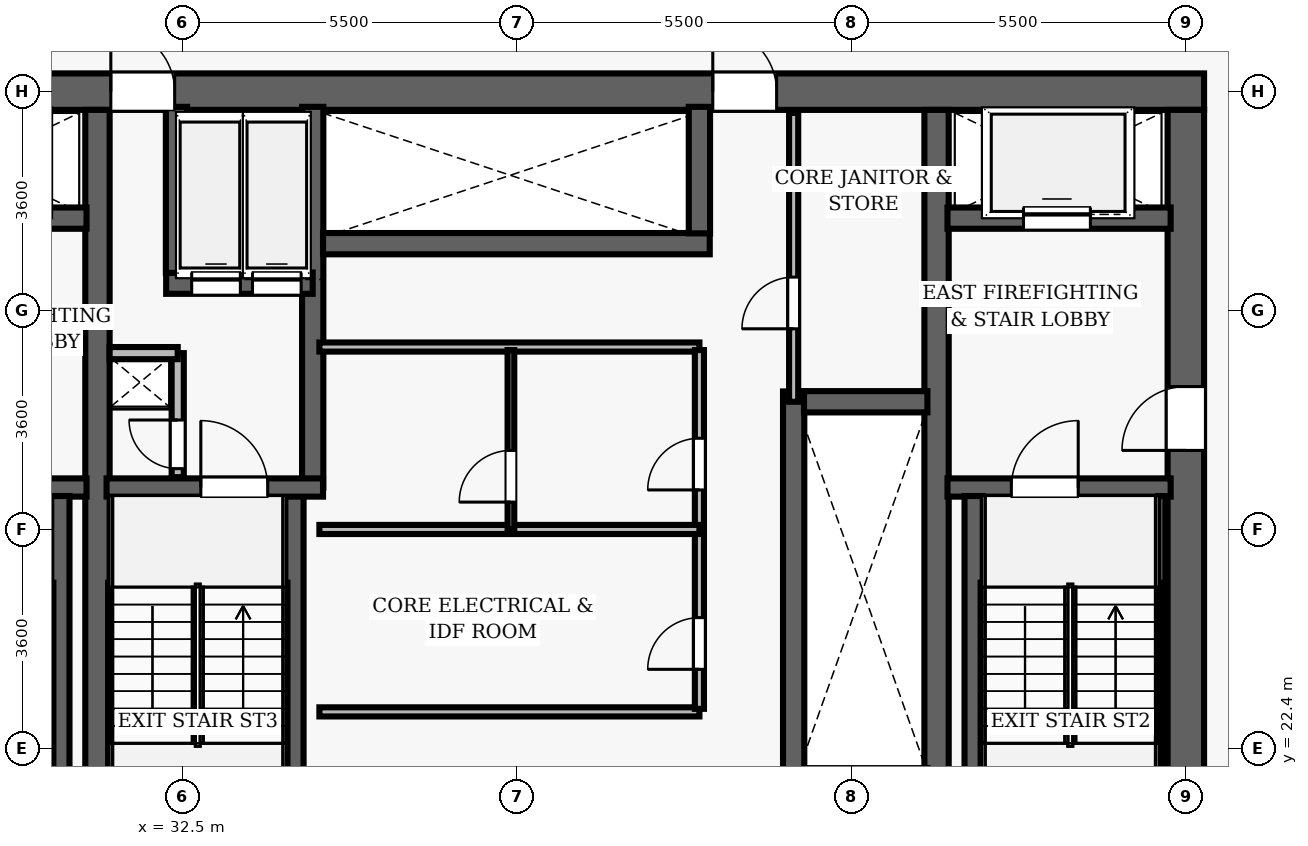
"""IFC4 building model, lengths in metres.
Left out: names, types, materials, properties, quantities, classifications, styles, units other than length and angle.
Written with IfcOpenShell. Run it as: python <this file> out.ifc"""

import sys

from ifc_helpers import new_model, si_unit, direction, frame, frame_2d, origin, place, context, subcontext, project, spatial, rectangle, extrude, element, fill, save


model = new_model("IFC4")
c1 = context("Model", 3, precision=1e-05, world=origin(), true_north=direction((0.0, 1.0)))
c2 = subcontext(c1, "Body", "Model", "MODEL_VIEW")
j1 = project(units=[si_unit("LENGTHUNIT", "METRE"), si_unit("PLANEANGLEUNIT", "RADIAN")], contexts=[c1])
p1 = place(None, origin())
s1 = spatial("IfcSite", under=j1, at=p1, CompositionType="ELEMENT")
p2 = place(p1, origin())
s2 = spatial("IfcBuilding", under=s1, at=p2, CompositionType="ELEMENT")
p3 = place(p2, frame((0.0, 0.0, 12.0)))
s3 = spatial("IfcBuildingStorey", under=s2, at=p3, CompositionType="ELEMENT", Elevation=12.0)
p4 = place(p3, frame((26.7, 33.2, 0.0), z_axis=(0.0, 0.0, 1.0), x_axis=(1.0, 0.0, 0.0)))
e1 = element("IfcWall", 1, at=p4, inside=s3, PredefinedType="SHEAR", context=c2, shape_type="SweptSolid", body=[
    extrude(rectangle(XDim=22.6, YDim=0.6, at=frame_2d((11.3, 0.0))), origin(), (0.0, 0.0, 1.0), 6.6),
])
p5 = place(p4, frame((4.62, 0.0, 0.0)))
e2 = element("IfcOpeningElement", 2, at=p5, cuts=e1, PredefinedType="OPENING", context=c2, shape_type="SweptSolid", body=[
    extrude(rectangle(XDim=1.05, YDim=2.15, at=frame_2d((0.525, 1.075))), frame((0.0, 0.31, 0.0), z_axis=(0.0, -1.0, 0.0), x_axis=(1.0, 0.0, 0.0)), (0.0, 0.0, 1.0), 0.62),
])
p6 = place(p4, frame((14.52, 0.0, 0.0)))
e3 = element("IfcOpeningElement", 3, at=p6, cuts=e1, PredefinedType="OPENING", context=c2, shape_type="SweptSolid", body=[
    extrude(rectangle(XDim=1.05, YDim=2.15, at=frame_2d((0.525, 1.075))), frame((0.0, 0.31, 0.0), z_axis=(0.0, -1.0, 0.0), x_axis=(1.0, 0.0, 0.0)), (0.0, 0.0, 1.0), 0.62),
])
p7 = place(p3, frame((49.0, 19.1, 0.0), z_axis=(0.0, 0.0, 1.0), x_axis=(0.0, 1.0, 0.0)))
e4 = element("IfcWall", 4, at=p7, inside=s3, PredefinedType="SHEAR", context=c2, shape_type="SweptSolid", body=[
    extrude(rectangle(XDim=13.8, YDim=0.6, at=frame_2d((6.9, 0.0))), origin(), (0.0, 0.0, 1.0), 6.6),
])
p8 = place(p7, frame((8.2, 0.0, 0.0)))
e5 = element("IfcOpeningElement", 5, at=p8, cuts=e4, PredefinedType="OPENING", context=c2, shape_type="SweptSolid", body=[
    extrude(rectangle(XDim=1.05, YDim=2.15, at=frame_2d((0.525, 1.075))), frame((0.0, 0.31, 0.0), z_axis=(0.0, -1.0, 0.0), x_axis=(1.0, 0.0, 0.0)), (0.0, 0.0, 1.0), 0.62),
])
for number, where, z_axis, x_axis in (
    (6, (31.1, 19.1, 0.0), (0.0, 0.0, 1.0), (0.0, 1.0, 0.0)),
    (7, (44.9, 19.1, 0.0), (0.0, 0.0, 1.0), (0.0, 1.0, 0.0)),
):
    element("IfcWall", number, at=place(p3, frame(where, z_axis=z_axis, x_axis=x_axis)), inside=s3, PredefinedType="SHEAR", context=c2, shape_type="SweptSolid", body=[
        extrude(rectangle(XDim=13.8, YDim=0.4, at=frame_2d((6.9, 0.0))), origin(), (0.0, 0.0, 1.0), 6.6),
    ])
p9 = place(p3, frame((27.25, 26.69, 0.0), z_axis=(0.0, 0.0, 1.0), x_axis=(1.0, 0.0, 0.0)))
e8 = element("IfcWall", 8, at=p9, inside=s3, PredefinedType="SHEAR", context=c2, shape_type="SweptSolid", body=[
    extrude(rectangle(XDim=3.67, YDim=0.3, at=frame_2d((1.835, 0.0))), origin(), (0.0, 0.0, 1.0), 6.6),
])
p10 = place(p9, frame((1.05, 0.0, 0.0)))
e9 = element("IfcOpeningElement", 9, at=p10, cuts=e8, PredefinedType="OPENING", context=c2, shape_type="SweptSolid", body=[
    extrude(rectangle(XDim=1.1, YDim=2.15, at=frame_2d((0.55, 1.075))), frame((0.0, 0.16, 0.0), z_axis=(0.0, -1.0, 0.0), x_axis=(1.0, 0.0, 0.0)), (0.0, 0.0, 1.0), 0.32),
])
p11 = place(p3, frame((30.49, 19.05, 0.0), z_axis=(0.0, 0.0, 1.0), x_axis=(0.0, 1.0, 0.0)))
e10 = element("IfcWall", 10, at=p11, inside=s3, PredefinedType="SHEAR", context=c2, shape_type="SweptSolid", body=[
    extrude(rectangle(XDim=7.5, YDim=0.3, at=frame_2d((3.75, 0.0))), origin(), (0.0, 0.0, 1.0), 6.6),
])
p12 = place(p3, frame((27.25, 31.12, 0.0), z_axis=(0.0, 0.0, 1.0), x_axis=(1.0, 0.0, 0.0)))
e11 = element("IfcWall", 11, at=p12, inside=s3, PredefinedType="SHEAR", context=c2, shape_type="SweptSolid", body=[
    extrude(rectangle(XDim=3.67, YDim=0.35, at=frame_2d((1.835, 0.0))), origin(), (0.0, 0.0, 1.0), 5.31),
])
p13 = place(p12, frame((1.25, 0.0, 0.0)))
e12 = element("IfcOpeningElement", 12, at=p13, cuts=e11, PredefinedType="OPENING", context=c2, shape_type="SweptSolid", body=[
    extrude(rectangle(XDim=1.1, YDim=2.15, at=frame_2d((0.55, 1.075))), frame((0.0, 0.185, 0.0), z_axis=(0.0, -1.0, 0.0), x_axis=(1.0, 0.0, 0.0)), (0.0, 0.0, 1.0), 0.37),
])
p14 = place(p3, frame((45.08, 26.69, 0.0), z_axis=(0.0, 0.0, 1.0), x_axis=(1.0, 0.0, 0.0)))
e13 = element("IfcWall", 13, at=p14, inside=s3, PredefinedType="SHEAR", context=c2, shape_type="SweptSolid", body=[
    extrude(rectangle(XDim=3.67, YDim=0.3, at=frame_2d((1.835, 0.0))), origin(), (0.0, 0.0, 1.0), 6.6),
])
p15 = place(p14, frame((1.05, 0.0, 0.0)))
e14 = element("IfcOpeningElement", 14, at=p15, cuts=e13, PredefinedType="OPENING", context=c2, shape_type="SweptSolid", body=[
    extrude(rectangle(XDim=1.1, YDim=2.15, at=frame_2d((0.55, 1.075))), frame((0.0, 0.16, 0.0), z_axis=(0.0, -1.0, 0.0), x_axis=(1.0, 0.0, 0.0)), (0.0, 0.0, 1.0), 0.32),
])
p16 = place(p3, frame((45.51, 19.05, 0.0), z_axis=(0.0, 0.0, 1.0), x_axis=(0.0, 1.0, 0.0)))
e15 = element("IfcWall", 15, at=p16, inside=s3, PredefinedType="SHEAR", context=c2, shape_type="SweptSolid", body=[
    extrude(rectangle(XDim=7.5, YDim=0.3, at=frame_2d((3.75, 0.0))), origin(), (0.0, 0.0, 1.0), 6.6),
])
p17 = place(p3, frame((48.605, 19.1, 0.0), z_axis=(0.0, 0.0, 1.0), x_axis=(0.0, 1.0, 0.0)))
e16 = element("IfcWall", 16, at=p17, inside=s3, PredefinedType="SHEAR", context=c2, shape_type="SweptSolid", body=[
    extrude(rectangle(XDim=7.45, YDim=0.12, at=frame_2d((3.725, 0.0))), origin(), (0.0, 0.0, 1.0), 6.6),
])
p18 = place(p3, frame((45.08, 31.12, 0.0), z_axis=(0.0, 0.0, 1.0), x_axis=(1.0, 0.0, 0.0)))
e17 = element("IfcWall", 17, at=p18, inside=s3, PredefinedType="SHEAR", context=c2, shape_type="SweptSolid", body=[
    extrude(rectangle(XDim=3.67, YDim=0.35, at=frame_2d((1.835, 0.0))), origin(), (0.0, 0.0, 1.0), 5.31),
])
p19 = place(p18, frame((1.25, 0.0, 0.0)))
e18 = element("IfcOpeningElement", 18, at=p19, cuts=e17, PredefinedType="OPENING", context=c2, shape_type="SweptSolid", body=[
    extrude(rectangle(XDim=1.1, YDim=2.15, at=frame_2d((0.55, 1.075))), frame((0.0, 0.185, 0.0), z_axis=(0.0, -1.0, 0.0), x_axis=(1.0, 0.0, 0.0)), (0.0, 0.0, 1.0), 0.37),
])
p20 = place(p3, frame((34.34, 19.05, 0.0), z_axis=(0.0, 0.0, 1.0), x_axis=(0.0, 1.0, 0.0)))
e19 = element("IfcWall", 19, at=p20, inside=s3, PredefinedType="SHEAR", context=c2, shape_type="SweptSolid", body=[
    extrude(rectangle(XDim=7.5, YDim=0.3, at=frame_2d((3.75, 0.0))), origin(), (0.0, 0.0, 1.0), 6.6),
])
p21 = place(p3, frame((34.64, 26.69, 0.0), z_axis=(0.0, 0.0, 1.0), x_axis=(0.0, 1.0, 0.0)))
e20 = element("IfcWall", 20, at=p21, inside=s3, PredefinedType="SHEAR", context=c2, shape_type="SweptSolid", body=[
    extrude(rectangle(XDim=6.26, YDim=0.35, at=frame_2d((3.13, 0.0))), origin(), (0.0, 0.0, 1.0), 6.6),
])
p22 = place(p3, frame((31.25, 26.69, 0.0), z_axis=(0.0, 0.0, 1.0), x_axis=(1.0, 0.0, 0.0)))
e21 = element("IfcWall", 21, at=p22, inside=s3, PredefinedType="SHEAR", context=c2, shape_type="SweptSolid", body=[
    extrude(rectangle(XDim=3.56, YDim=0.3, at=frame_2d((1.78, 0.0))), origin(), (0.0, 0.0, 1.0), 6.6),
])
p23 = place(p22, frame((1.55, 0.0, 0.0)))
e22 = element("IfcOpeningElement", 22, at=p23, cuts=e21, PredefinedType="OPENING", context=c2, shape_type="SweptSolid", body=[
    extrude(rectangle(XDim=1.1, YDim=2.15, at=frame_2d((0.55, 1.075))), frame((0.0, 0.16, 0.0), z_axis=(0.0, -1.0, 0.0), x_axis=(1.0, 0.0, 0.0)), (0.0, 0.0, 1.0), 0.32),
])
p24 = place(p3, frame((32.23, 30.05, 0.0), z_axis=(0.0, 0.0, 1.0), x_axis=(1.0, 0.0, 0.0)))
e23 = element("IfcWall", 23, at=p24, inside=s3, PredefinedType="SHEAR", context=c2, shape_type="SweptSolid", body=[
    extrude(rectangle(XDim=2.41, YDim=0.35, at=frame_2d((1.205, 0.0))), origin(), (0.0, 0.0, 1.0), 5.31),
])
p25 = place(p24, frame((0.42, 0.0, 0.0)))
e24 = element("IfcOpeningElement", 24, at=p25, cuts=e23, PredefinedType="OPENING", context=c2, shape_type="SweptSolid", body=[
    extrude(rectangle(XDim=0.8, YDim=2.15, at=frame_2d((0.4, 1.075))), frame((0.0, 0.185, 0.0), z_axis=(0.0, -1.0, 0.0), x_axis=(1.0, 0.0, 0.0)), (0.0, 0.0, 1.0), 0.37),
])
p26 = place(p24, frame((1.42, 0.0, 0.0)))
e25 = element("IfcOpeningElement", 25, at=p26, cuts=e23, PredefinedType="OPENING", context=c2, shape_type="SweptSolid", body=[
    extrude(rectangle(XDim=0.8, YDim=2.15, at=frame_2d((0.4, 1.075))), frame((0.0, 0.185, 0.0), z_axis=(0.0, -1.0, 0.0), x_axis=(1.0, 0.0, 0.0)), (0.0, 0.0, 1.0), 0.37),
])
p27 = place(p3, frame((32.4, 30.22, 0.0), z_axis=(0.0, 0.0, 1.0), x_axis=(0.0, 1.0, 0.0)))
e26 = element("IfcWall", 26, at=p27, inside=s3, PredefinedType="SHEAR", context=c2, shape_type="SweptSolid", body=[
    extrude(rectangle(XDim=2.73, YDim=0.35, at=frame_2d((1.365, 0.0))), origin(), (0.0, 0.0, 1.0), 5.31),
])
p28 = place(p3, frame((32.42, 26.86, 0.0), z_axis=(0.0, 0.0, 1.0), x_axis=(0.0, 1.0, 0.0)))
e27 = element("IfcWall", 27, at=p28, inside=s3, PredefinedType="PARTITIONING", context=c2, shape_type="SweptSolid", body=[
    extrude(rectangle(XDim=2.04, YDim=0.2, at=frame_2d((1.02, 0.0))), origin(), (0.0, 0.0, 1.0), 5.31),
])
p29 = place(p28, frame((0.14, 0.0, 0.0)))
e28 = element("IfcOpeningElement", 28, at=p29, cuts=e27, PredefinedType="OPENING", context=c2, shape_type="SweptSolid", body=[
    extrude(rectangle(XDim=0.8, YDim=2.05, at=frame_2d((0.4, 1.025))), frame((0.0, 0.11, 0.0), z_axis=(0.0, -1.0, 0.0), x_axis=(1.0, 0.0, 0.0)), (0.0, 0.0, 1.0), 0.22),
])
p30 = place(p3, frame((31.3, 28.9, 0.0), z_axis=(0.0, 0.0, 1.0), x_axis=(1.0, 0.0, 0.0)))
e29 = element("IfcWall", 29, at=p30, inside=s3, PredefinedType="PARTITIONING", context=c2, shape_type="SweptSolid", body=[
    extrude(rectangle(XDim=1.12, YDim=0.2, at=frame_2d((0.56, 0.0))), origin(), (0.0, 0.0, 1.0), 5.31),
])
p31 = place(p3, frame((42.55, 21.73, 0.0), z_axis=(0.0, 0.0, 1.0), x_axis=(0.0, 1.0, 0.0)))
e30 = element("IfcWall", 30, at=p31, inside=s3, PredefinedType="SHEAR", context=c2, shape_type="SweptSolid", body=[
    extrude(rectangle(XDim=6.54, YDim=0.35, at=frame_2d((3.27, 0.0))), origin(), (0.0, 0.0, 1.0), 5.31),
])
p32 = place(p3, frame((42.72, 28.1, 0.0), z_axis=(0.0, 0.0, 1.0), x_axis=(1.0, 0.0, 0.0)))
e31 = element("IfcWall", 31, at=p32, inside=s3, PredefinedType="SHEAR", context=c2, shape_type="SweptSolid", body=[
    extrude(rectangle(XDim=2.03, YDim=0.35, at=frame_2d((1.015, 0.0))), origin(), (0.0, 0.0, 1.0), 5.31),
])
p33 = place(p3, frame((34.81, 30.7, 0.0), z_axis=(0.0, 0.0, 1.0), x_axis=(1.0, 0.0, 0.0)))
e32 = element("IfcWall", 32, at=p33, inside=s3, PredefinedType="SHEAR", context=c2, shape_type="SweptSolid", body=[
    extrude(rectangle(XDim=6.36, YDim=0.35, at=frame_2d((3.18, 0.0))), origin(), (0.0, 0.0, 1.0), 5.31),
])
p34 = place(p3, frame((41.0, 30.87, 0.0), z_axis=(0.0, 0.0, 1.0), x_axis=(0.0, 1.0, 0.0)))
e33 = element("IfcWall", 33, at=p34, inside=s3, PredefinedType="SHEAR", context=c2, shape_type="SweptSolid", body=[
    extrude(rectangle(XDim=2.08, YDim=0.35, at=frame_2d((1.04, 0.0))), origin(), (0.0, 0.0, 1.0), 5.31),
])
for number, where, z_axis, x_axis in (
    (34, (34.75, 29.0, 0.0), (0.0, 0.0, 1.0), (1.0, 0.0, 0.0)),
    (35, (34.75, 23.0, 0.0), (0.0, 0.0, 1.0), (1.0, 0.0, 0.0)),
):
    element("IfcWall", number, at=place(p3, frame(where, z_axis=z_axis, x_axis=x_axis)), inside=s3, PredefinedType="PARTITIONING", context=c2, shape_type="SweptSolid", body=[
        extrude(rectangle(XDim=6.25, YDim=0.15, at=frame_2d((3.125, 0.0))), origin(), (0.0, 0.0, 1.0), 5.31),
    ])
p35 = place(p3, frame((41.0, 23.05, 0.0), z_axis=(0.0, 0.0, 1.0), x_axis=(0.0, 1.0, 0.0)))
e36 = element("IfcWall", 36, at=p35, inside=s3, PredefinedType="PARTITIONING", context=c2, shape_type="SweptSolid", body=[
    extrude(rectangle(XDim=5.9, YDim=0.15, at=frame_2d((2.95, 0.0))), origin(), (0.0, 0.0, 1.0), 5.31),
])
p36 = place(p35, frame((0.65, 0.0, 0.0)))
e37 = element("IfcOpeningElement", 37, at=p36, cuts=e36, PredefinedType="OPENING", context=c2, shape_type="SweptSolid", body=[
    extrude(rectangle(XDim=0.85, YDim=2.1, at=frame_2d((0.425, 1.05))), frame((0.0, 0.085, 0.0), z_axis=(0.0, -1.0, 0.0), x_axis=(1.0, 0.0, 0.0)), (0.0, 0.0, 1.0), 0.17),
])
p37 = place(p35, frame((3.6, 0.0, 0.0)))
e38 = element("IfcOpeningElement", 38, at=p37, cuts=e36, PredefinedType="OPENING", context=c2, shape_type="SweptSolid", body=[
    extrude(rectangle(XDim=0.85, YDim=2.1, at=frame_2d((0.425, 1.05))), frame((0.0, 0.085, 0.0), z_axis=(0.0, -1.0, 0.0), x_axis=(1.0, 0.0, 0.0)), (0.0, 0.0, 1.0), 0.17),
])
p38 = place(p3, frame((34.75, 26.0, 0.0), z_axis=(0.0, 0.0, 1.0), x_axis=(1.0, 0.0, 0.0)))
e39 = element("IfcWall", 39, at=p38, inside=s3, PredefinedType="PARTITIONING", context=c2, shape_type="SweptSolid", body=[
    extrude(rectangle(XDim=6.25, YDim=0.15, at=frame_2d((3.125, 0.0))), origin(), (0.0, 0.0, 1.0), 5.31),
])
p39 = place(p3, frame((37.9, 26.0, 0.0), z_axis=(0.0, 0.0, 1.0), x_axis=(0.0, 1.0, 0.0)))
e40 = element("IfcWall", 40, at=p39, inside=s3, PredefinedType="PARTITIONING", context=c2, shape_type="SweptSolid", body=[
    extrude(rectangle(XDim=2.95, YDim=0.11, at=frame_2d((1.475, 0.0))), origin(), (0.0, 0.0, 1.0), 5.31),
])
p40 = place(p39, frame((0.45, 0.0, 0.0)))
e41 = element("IfcOpeningElement", 41, at=p40, cuts=e40, PredefinedType="OPENING", context=c2, shape_type="SweptSolid", body=[
    extrude(rectangle(XDim=0.85, YDim=2.1, at=frame_2d((0.425, 1.05))), frame((0.0, 0.065, 0.0), z_axis=(0.0, -1.0, 0.0), x_axis=(1.0, 0.0, 0.0)), (0.0, 0.0, 1.0), 0.13),
])
p41 = place(p3, frame((42.55, 28.1, 0.0), z_axis=(0.0, 0.0, 1.0), x_axis=(0.0, 1.0, 0.0)))
e42 = element("IfcWall", 42, at=p41, inside=s3, PredefinedType="PARTITIONING", context=c2, shape_type="SweptSolid", body=[
    extrude(rectangle(XDim=4.75, YDim=0.15, at=frame_2d((2.375, 0.0))), origin(), (0.0, 0.0, 1.0), 5.31),
])
p42 = place(p41, frame((1.2, 0.0, 0.0)))
e43 = element("IfcOpeningElement", 43, at=p42, cuts=e42, PredefinedType="OPENING", context=c2, shape_type="SweptSolid", body=[
    extrude(rectangle(XDim=0.85, YDim=2.1, at=frame_2d((0.425, 1.05))), frame((0.0, 0.085, 0.0), z_axis=(0.0, -1.0, 0.0), x_axis=(1.0, 0.0, 0.0)), (0.0, 0.0, 1.0), 0.17),
])
p43 = place(p15, origin())
e44 = element("IfcDoor", 44, at=p43, inside=s3, OperationType="SINGLE_SWING_RIGHT", PredefinedType="DOOR", context=c2, shape_type="SweptSolid", body=[
    extrude(rectangle(XDim=1.1, YDim=2.15, at=frame_2d((0.55, 1.075))), frame((0.0, 0.025, 0.0), z_axis=(0.0, -1.0, 0.0), x_axis=(1.0, 0.0, 0.0)), (0.0, 0.0, 1.0), 0.05),
])
fill(e14, e44)
p44 = place(p8, origin())
e45 = element("IfcDoor", 45, at=p44, inside=s3, OperationType="SINGLE_SWING_LEFT", PredefinedType="DOOR", context=c2, shape_type="SweptSolid", body=[
    extrude(rectangle(XDim=1.05, YDim=2.15, at=frame_2d((0.525, 1.075))), frame((0.0, 0.025, 0.0), z_axis=(0.0, -1.0, 0.0), x_axis=(1.0, 0.0, 0.0)), (0.0, 0.0, 1.0), 0.05),
])
fill(e5, e45)
p45 = place(p23, origin())
e46 = element("IfcDoor", 46, at=p45, inside=s3, OperationType="SINGLE_SWING_LEFT", PredefinedType="DOOR", context=c2, shape_type="SweptSolid", body=[
    extrude(rectangle(XDim=1.1, YDim=2.15, at=frame_2d((0.55, 1.075))), frame((0.0, 0.025, 0.0), z_axis=(0.0, -1.0, 0.0), x_axis=(1.0, 0.0, 0.0)), (0.0, 0.0, 1.0), 0.05),
])
fill(e22, e46)
p46 = place(p29, origin())
e47 = element("IfcDoor", 47, at=p46, inside=s3, OperationType="SINGLE_SWING_RIGHT", PredefinedType="DOOR", context=c2, shape_type="SweptSolid", body=[
    extrude(rectangle(XDim=0.8, YDim=2.05, at=frame_2d((0.4, 1.025))), frame((0.0, 0.025, 0.0), z_axis=(0.0, -1.0, 0.0), x_axis=(1.0, 0.0, 0.0)), (0.0, 0.0, 1.0), 0.05),
])
fill(e28, e47)
p47 = place(p5, origin())
e48 = element("IfcDoor", 48, at=p47, inside=s3, OperationType="SINGLE_SWING_LEFT", PredefinedType="DOOR", context=c2, shape_type="SweptSolid", body=[
    extrude(rectangle(XDim=1.05, YDim=2.15, at=frame_2d((0.525, 1.075))), frame((0.0, 0.025, 0.0), z_axis=(0.0, -1.0, 0.0), x_axis=(1.0, 0.0, 0.0)), (0.0, 0.0, 1.0), 0.05),
])
fill(e2, e48)
p48 = place(p6, origin())
e49 = element("IfcDoor", 49, at=p48, inside=s3, OperationType="SINGLE_SWING_LEFT", PredefinedType="DOOR", context=c2, shape_type="SweptSolid", body=[
    extrude(rectangle(XDim=1.05, YDim=2.15, at=frame_2d((0.525, 1.075))), frame((0.0, 0.025, 0.0), z_axis=(0.0, -1.0, 0.0), x_axis=(1.0, 0.0, 0.0)), (0.0, 0.0, 1.0), 0.05),
])
fill(e3, e49)
p49 = place(p36, origin())
e50 = element("IfcDoor", 50, at=p49, inside=s3, OperationType="SINGLE_SWING_LEFT", PredefinedType="DOOR", context=c2, shape_type="SweptSolid", body=[
    extrude(rectangle(XDim=0.85, YDim=2.1, at=frame_2d((0.425, 1.05))), frame((0.0, 0.025, 0.0), z_axis=(0.0, -1.0, 0.0), x_axis=(1.0, 0.0, 0.0)), (0.0, 0.0, 1.0), 0.05),
])
fill(e37, e50)
p50 = place(p37, origin())
e51 = element("IfcDoor", 51, at=p50, inside=s3, OperationType="SINGLE_SWING_LEFT", PredefinedType="DOOR", context=c2, shape_type="SweptSolid", body=[
    extrude(rectangle(XDim=0.85, YDim=2.1, at=frame_2d((0.425, 1.05))), frame((0.0, 0.025, 0.0), z_axis=(0.0, -1.0, 0.0), x_axis=(1.0, 0.0, 0.0)), (0.0, 0.0, 1.0), 0.05),
])
fill(e38, e51)
p51 = place(p40, origin())
e52 = element("IfcDoor", 52, at=p51, inside=s3, OperationType="SINGLE_SWING_LEFT", PredefinedType="DOOR", context=c2, shape_type="SweptSolid", body=[
    extrude(rectangle(XDim=0.85, YDim=2.1, at=frame_2d((0.425, 1.05))), frame((0.0, 0.025, 0.0), z_axis=(0.0, -1.0, 0.0), x_axis=(1.0, 0.0, 0.0)), (0.0, 0.0, 1.0), 0.05),
])
fill(e41, e52)
p52 = place(p42, origin())
e53 = element("IfcDoor", 53, at=p52, inside=s3, OperationType="SINGLE_SWING_LEFT", PredefinedType="DOOR", context=c2, shape_type="SweptSolid", body=[
    extrude(rectangle(XDim=0.85, YDim=2.1, at=frame_2d((0.425, 1.05))), frame((0.0, 0.025, 0.0), z_axis=(0.0, -1.0, 0.0), x_axis=(1.0, 0.0, 0.0)), (0.0, 0.0, 1.0), 0.05),
])
fill(e43, e53)
p53 = place(p19, origin())
e54 = element("IfcDoor", 54, at=p53, inside=s3, OperationType="SLIDING_TO_LEFT", PredefinedType="DOOR", context=c2, shape_type="SweptSolid", body=[
    extrude(rectangle(XDim=1.1, YDim=2.15, at=frame_2d((0.55, 1.075))), frame((0.0, 0.025, 0.0), z_axis=(0.0, -1.0, 0.0), x_axis=(1.0, 0.0, 0.0)), (0.0, 0.0, 1.0), 0.05),
])
fill(e18, e54)
p54 = place(p25, origin())
e55 = element("IfcDoor", 55, at=p54, inside=s3, OperationType="SLIDING_TO_LEFT", PredefinedType="DOOR", context=c2, shape_type="SweptSolid", body=[
    extrude(rectangle(XDim=0.8, YDim=2.15, at=frame_2d((0.4, 1.075))), frame((0.0, 0.025, 0.0), z_axis=(0.0, -1.0, 0.0), x_axis=(1.0, 0.0, 0.0)), (0.0, 0.0, 1.0), 0.05),
])
fill(e24, e55)
p55 = place(p26, origin())
e56 = element("IfcDoor", 56, at=p55, inside=s3, OperationType="SLIDING_TO_LEFT", PredefinedType="DOOR", context=c2, shape_type="SweptSolid", body=[
    extrude(rectangle(XDim=0.8, YDim=2.15, at=frame_2d((0.4, 1.075))), frame((0.0, 0.025, 0.0), z_axis=(0.0, -1.0, 0.0), x_axis=(1.0, 0.0, 0.0)), (0.0, 0.0, 1.0), 0.05),
])
fill(e25, e56)
save(model, sys.argv[1])
